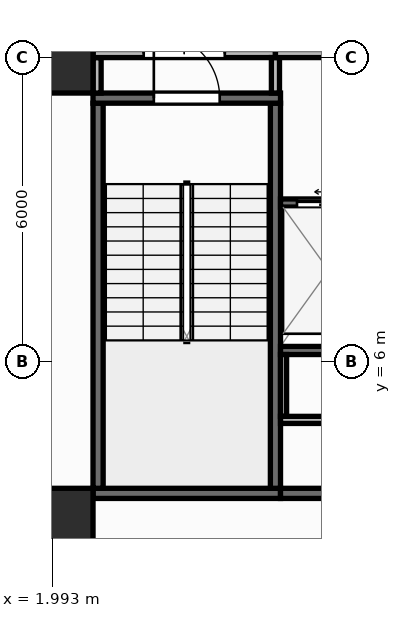
"""IFC4 building model, lengths in metres.
Left out: names, types, materials, properties, quantities, classifications, styles, units other than length and angle.
Written with IfcOpenShell. Run it as: python <this file> out.ifc"""

import sys

from ifc_helpers import new_model, si_unit, direction, frame, frame_2d, origin, origin_2d, place, context, subcontext, project, spatial, rectangle, extrude, element, fill, save


model = new_model("IFC4")
c1 = context("Model", 3, precision=1e-05, world=origin(), true_north=direction((0.0, 1.0)))
c2 = subcontext(c1, "Body", "Model", "MODEL_VIEW")
j1 = project(units=[si_unit("LENGTHUNIT", "METRE"), si_unit("PLANEANGLEUNIT", "RADIAN")], contexts=[c1])
p1 = place(None, origin())
s1 = spatial("IfcSite", under=j1, at=p1, CompositionType="ELEMENT")
p2 = place(p1, origin())
s2 = spatial("IfcBuilding", under=s1, at=p2, CompositionType="ELEMENT")
p3 = place(p2, frame((0.0, 0.0, 4.5)))
s3 = spatial("IfcBuildingStorey", under=s2, at=p3, CompositionType="ELEMENT", Elevation=4.5)
for number, where, z_axis, x_axis in (
    (1, (2.1, 2.8, 0.0), (0.0, 0.0, 1.0), (1.0, 0.0, 0.0)),
    (2, (2.1, 12.0, 0.0), (0.0, 0.0, 1.0), (1.0, 0.0, 0.0)),
):
    element("IfcColumn", number, at=place(p3, frame(where, z_axis=z_axis, x_axis=x_axis)), inside=s3, PredefinedType="COLUMN", context=c2, shape_type="SweptSolid", body=[
        extrude(rectangle(XDim=1.4, YDim=1.4, at=origin_2d()), origin(), (0.0, 0.0, 1.0), 4.5),
    ])
p4 = place(p3, frame((2.8, 3.4, 0.0), z_axis=(0.0, 0.0, 1.0), x_axis=(1.0, 0.0, 0.0)))
e3 = element("IfcWall", 3, at=p4, inside=s3, PredefinedType="SHEAR", context=c2, shape_type="SweptSolid", body=[
    extrude(rectangle(XDim=3.7, YDim=0.2, at=frame_2d((1.85, 0.0))), origin(), (0.0, 0.0, 1.0), 4.25),
])
for number, where, z_axis, x_axis in (
    (4, (2.9, 3.5, 0.0), (0.0, 0.0, 1.0), (0.0, 1.0, 0.0)),
    (5, (6.4, 3.5, 0.0), (0.0, 0.0, 1.0), (0.0, 1.0, 0.0)),
):
    element("IfcWall", number, at=place(p3, frame(where, z_axis=z_axis, x_axis=x_axis)), inside=s3, PredefinedType="SHEAR", context=c2, shape_type="SweptSolid", body=[
        extrude(rectangle(XDim=7.6, YDim=0.2, at=frame_2d((3.8, 0.0))), origin(), (0.0, 0.0, 1.0), 4.25),
    ])
p5 = place(p3, frame((2.8, 11.2, 0.0), z_axis=(0.0, 0.0, 1.0), x_axis=(1.0, 0.0, 0.0)))
e6 = element("IfcWall", 6, at=p5, inside=s3, PredefinedType="SHEAR", context=c2, shape_type="SweptSolid", body=[
    extrude(rectangle(XDim=3.7, YDim=0.2, at=frame_2d((1.85, 0.0))), origin(), (0.0, 0.0, 1.0), 4.25),
])
p6 = place(p5, frame((1.2, 0.0, 0.0)))
e7 = element("IfcOpeningElement", 7, at=p6, cuts=e6, PredefinedType="OPENING", context=c2, shape_type="SweptSolid", body=[
    extrude(rectangle(XDim=1.3, YDim=2.15, at=frame_2d((0.65, 1.075))), frame((0.0, 0.11, 0.0), z_axis=(0.0, -1.0, 0.0), x_axis=(1.0, 0.0, 0.0)), (0.0, 0.0, 1.0), 0.22),
])
p7 = place(p3, frame((6.5, 3.4, 0.0), z_axis=(0.0, 0.0, 1.0), x_axis=(1.0, 0.0, 0.0)))
e8 = element("IfcWall", 8, at=p7, inside=s3, PredefinedType="SHEAR", context=c2, shape_type="SweptSolid", body=[
    extrude(rectangle(XDim=13.7, YDim=0.2, at=frame_2d((6.85, 0.0))), origin(), (0.0, 0.0, 1.0), 4.25),
])
p8 = place(p3, frame((6.5, 6.22, 0.0), z_axis=(0.0, 0.0, 1.0), x_axis=(1.0, 0.0, 0.0)))
e9 = element("IfcWall", 9, at=p8, inside=s3, PredefinedType="SHEAR", context=c2, shape_type="SweptSolid", body=[
    extrude(rectangle(XDim=12.11, YDim=0.16, at=frame_2d((6.055, 0.0))), origin(), (0.0, 0.0, 1.0), 4.25),
])
p9 = place(p3, frame((6.5, 9.13, 0.0), z_axis=(0.0, 0.0, 1.0), x_axis=(1.0, 0.0, 0.0)))
e10 = element("IfcWall", 10, at=p9, inside=s3, PredefinedType="SHEAR", context=c2, shape_type="SweptSolid", body=[
    extrude(rectangle(XDim=1.975, YDim=0.16, at=frame_2d((0.988, 0.0))), origin(), (0.0, 0.0, 1.0), 4.25),
])
p10 = place(p9, frame((0.325, 0.0, 0.0)))
e11 = element("IfcOpeningElement", 11, at=p10, cuts=e10, PredefinedType="OPENING", context=c2, shape_type="SweptSolid", body=[
    extrude(rectangle(XDim=1.25, YDim=2.15, at=frame_2d((0.625, 1.075))), frame((0.0, 0.09, 0.0), z_axis=(0.0, -1.0, 0.0), x_axis=(1.0, 0.0, 0.0)), (0.0, 0.0, 1.0), 0.18),
])
p11 = place(p3, frame((6.56, 4.92, 0.0), z_axis=(0.0, 0.0, 1.0), x_axis=(0.0, 1.0, 0.0)))
e12 = element("IfcWall", 12, at=p11, inside=s3, PredefinedType="PARTITIONING", context=c2, shape_type="SweptSolid", body=[
    extrude(rectangle(XDim=1.22, YDim=0.12, at=frame_2d((0.61, 0.0))), origin(), (0.0, 0.0, 1.0), 4.25),
])
p12 = place(p3, frame((6.5, 4.85, 0.0), z_axis=(0.0, 0.0, 1.0), x_axis=(1.0, 0.0, 0.0)))
e13 = element("IfcWall", 13, at=p12, inside=s3, PredefinedType="PARTITIONING", context=c2, shape_type="SweptSolid", body=[
    extrude(rectangle(XDim=2.87, YDim=0.14, at=frame_2d((1.435, 0.0))), origin(), (0.0, 0.0, 1.0), 4.25),
])
p13 = place(p12, frame((0.885, 0.0, 0.0)))
e14 = element("IfcOpeningElement", 14, at=p13, cuts=e13, PredefinedType="OPENING", context=c2, shape_type="SweptSolid", body=[
    extrude(rectangle(XDim=1.1, YDim=2.1, at=frame_2d((0.55, 1.05))), frame((0.0, 0.08, 0.0), z_axis=(0.0, -1.0, 0.0), x_axis=(1.0, 0.0, 0.0)), (0.0, 0.0, 1.0), 0.16),
])
p14 = place(p3, frame((2.88, 11.3, 0.0), z_axis=(0.0, 0.0, 1.0), x_axis=(0.0, 1.0, 0.0)))
e15 = element("IfcWall", 15, at=p14, inside=s3, PredefinedType="PARTITIONING", context=c2, shape_type="SweptSolid", body=[
    extrude(rectangle(XDim=0.7, YDim=0.16, at=frame_2d((0.35, 0.0))), origin(), (0.0, 0.0, 1.0), 4.25),
])
p15 = place(p3, frame((2.8, 12.08, 0.0), z_axis=(0.0, 0.0, 1.0), x_axis=(1.0, 0.0, 0.0)))
e16 = element("IfcWall", 16, at=p15, inside=s3, PredefinedType="PARTITIONING", context=c2, shape_type="SweptSolid", body=[
    extrude(rectangle(XDim=3.6, YDim=0.16, at=frame_2d((1.8, 0.0))), origin(), (0.0, 0.0, 1.0), 3.425),
])
p16 = place(p15, frame((1.0, 0.0, 0.0)))
e17 = element("IfcOpeningElement", 17, at=p16, cuts=e16, PredefinedType="OPENING", context=c2, shape_type="SweptSolid", body=[
    extrude(rectangle(XDim=1.6, YDim=2.05, at=frame_2d((0.8, 1.025))), frame((0.0, 0.09, 0.0), z_axis=(0.0, -1.0, 0.0), x_axis=(1.0, 0.0, 0.0)), (0.0, 0.0, 1.0), 0.18),
])
p17 = place(p3, frame((6.4, 11.3, 0.0), z_axis=(0.0, 0.0, 1.0), x_axis=(0.0, 1.0, 0.0)))
e18 = element("IfcWall", 18, at=p17, inside=s3, PredefinedType="PARTITIONING", context=c2, shape_type="SweptSolid", body=[
    extrude(rectangle(XDim=0.7, YDim=0.16, at=frame_2d((0.35, 0.0))), origin(), (0.0, 0.0, 1.0), 4.25),
])
p18 = place(p3, frame((6.4, 12.08, 0.0), z_axis=(0.0, 0.0, 1.0), x_axis=(1.0, 0.0, 0.0)))
e19 = element("IfcWall", 19, at=p18, inside=s3, PredefinedType="PARTITIONING", context=c2, shape_type="SweptSolid", body=[
    extrude(rectangle(XDim=6.18, YDim=0.16, at=frame_2d((3.09, 0.0))), origin(), (0.0, 0.0, 1.0), 3.425),
])
p19 = place(p18, frame((2.29, 0.0, 0.0)))
e20 = element("IfcOpeningElement", 20, at=p19, cuts=e19, PredefinedType="OPENING", context=c2, shape_type="SweptSolid", body=[
    extrude(rectangle(XDim=1.6, YDim=2.05, at=frame_2d((0.8, 1.025))), frame((0.0, 0.09, 0.0), z_axis=(0.0, -1.0, 0.0), x_axis=(1.0, 0.0, 0.0)), (0.0, 0.0, 1.0), 0.18),
])
p20 = place(p6, origin())
e21 = element("IfcDoor", 21, at=p20, inside=s3, OperationType="SINGLE_SWING_LEFT", PredefinedType="DOOR", context=c2, shape_type="SweptSolid", body=[
    extrude(rectangle(XDim=1.3, YDim=2.15, at=frame_2d((0.65, 1.075))), frame((0.0, 0.025, 0.0), z_axis=(0.0, -1.0, 0.0), x_axis=(1.0, 0.0, 0.0)), (0.0, 0.0, 1.0), 0.05),
])
fill(e7, e21)
p21 = place(p10, origin())
e22 = element("IfcDoor", 22, at=p21, inside=s3, OperationType="SLIDING_TO_LEFT", PredefinedType="DOOR", context=c2, shape_type="SweptSolid", body=[
    extrude(rectangle(XDim=1.25, YDim=2.15, at=frame_2d((0.625, 1.075))), frame((0.0, 0.025, 0.0), z_axis=(0.0, -1.0, 0.0), x_axis=(1.0, 0.0, 0.0)), (0.0, 0.0, 1.0), 0.05),
])
fill(e11, e22)
p22 = place(p16, origin())
e23 = element("IfcDoor", 23, at=p22, inside=s3, OperationType="DOUBLE_DOOR_SINGLE_SWING", PredefinedType="DOOR", context=c2, shape_type="SweptSolid", body=[
    extrude(rectangle(XDim=1.6, YDim=2.05, at=frame_2d((0.8, 1.025))), frame((0.0, 0.025, 0.0), z_axis=(0.0, -1.0, 0.0), x_axis=(1.0, 0.0, 0.0)), (0.0, 0.0, 1.0), 0.05),
])
fill(e17, e23)
save(model, sys.argv[1])
